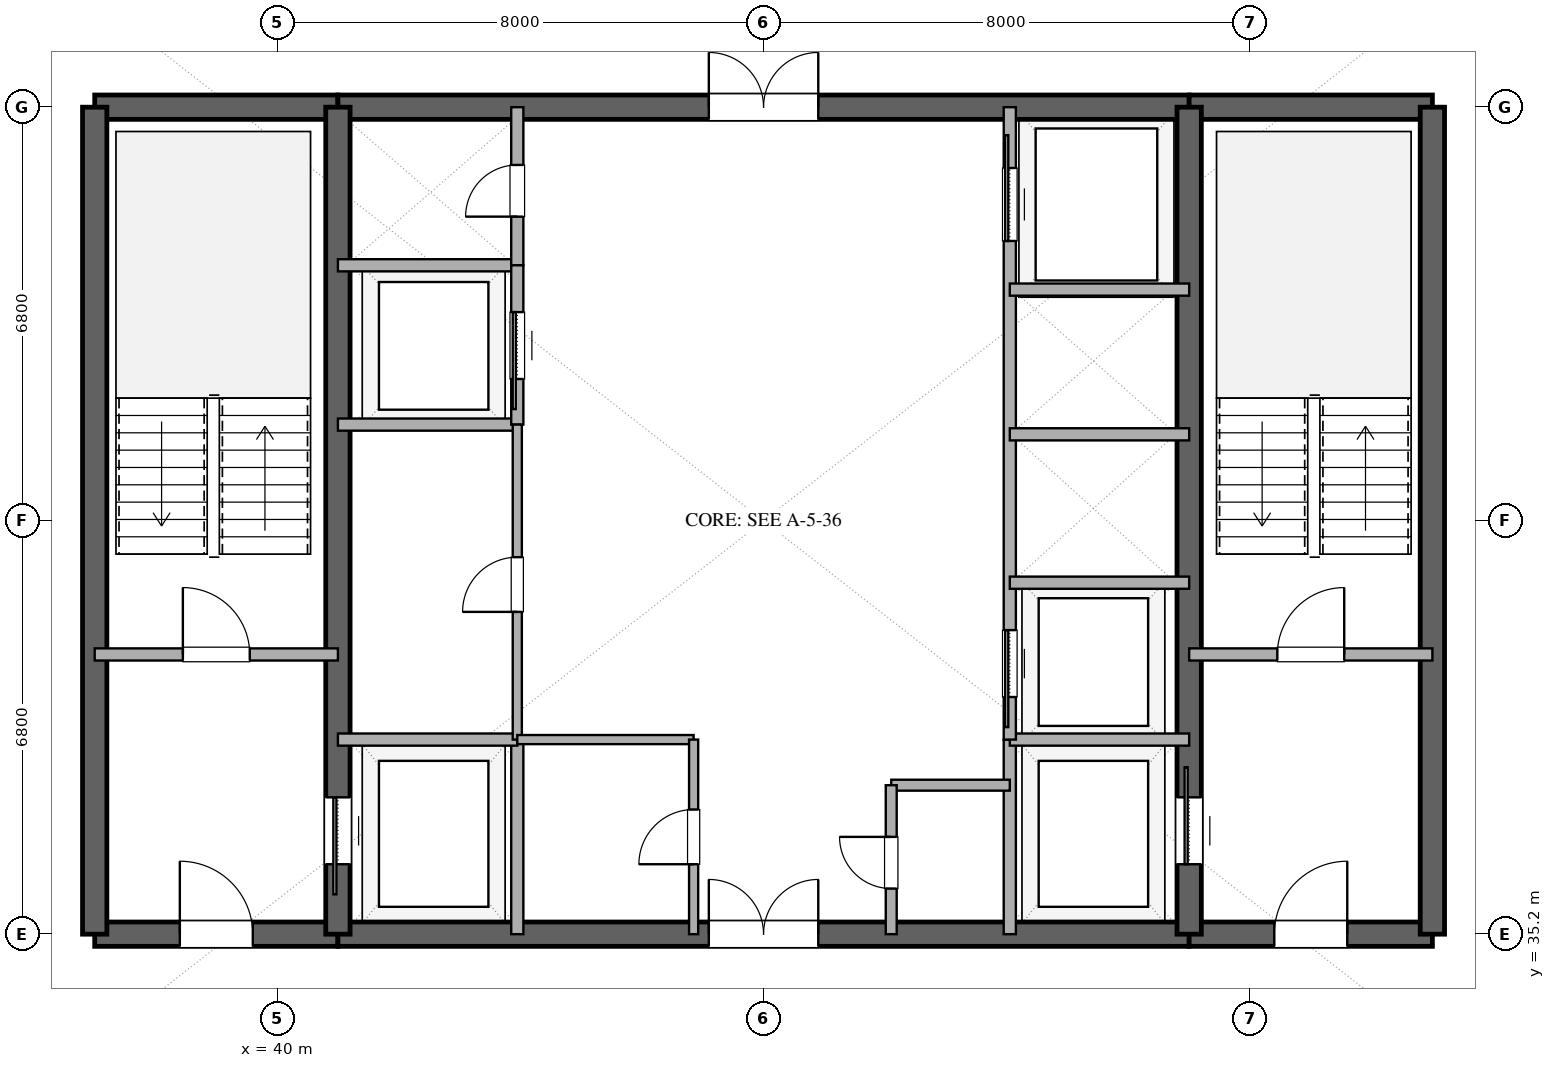
"""IFC4 building model, lengths in metres.
Left out: names, types, materials, properties, quantities, classifications, styles, units other than length and angle.
Written with IfcOpenShell. Run it as: python <this file> out.ifc"""

import sys

from ifc_helpers import new_model, si_unit, direction, frame, frame_2d, origin, place, context, subcontext, project, spatial, rectangle, extrude, element, fill, save


model = new_model("IFC4")
c1 = context("Model", 3, precision=1e-05, world=origin(), true_north=direction((0.0, 1.0)))
c2 = subcontext(c1, "Body", "Model", "MODEL_VIEW")
j1 = project(units=[si_unit("LENGTHUNIT", "METRE"), si_unit("PLANEANGLEUNIT", "RADIAN")], contexts=[c1])
p1 = place(None, origin())
s1 = spatial("IfcSite", under=j1, at=p1, CompositionType="ELEMENT")
p2 = place(p1, origin())
s2 = spatial("IfcBuilding", under=s1, at=p2, CompositionType="ELEMENT")
p3 = place(p2, frame((0.0, 0.0, 249.6)))
s3 = spatial("IfcBuildingStorey", under=s2, at=p3, CompositionType="ELEMENT", Elevation=249.6)
p4 = place(p3, frame((37.0, 35.2, 0.0), z_axis=(0.0, 0.0, 1.0), x_axis=(1.0, 0.0, 0.0)))
e1 = element("IfcWall", 1, at=p4, inside=s3, PredefinedType="SHEAR", context=c2, shape_type="SweptSolid", body=[
    extrude(rectangle(XDim=4.0, YDim=0.4, at=frame_2d((2.0, 0.0))), origin(), (0.0, 0.0, 1.0), 3.36),
])
p5 = place(p4, frame((1.4, 0.0, 0.0)))
e2 = element("IfcOpeningElement", 2, at=p5, cuts=e1, PredefinedType="OPENING", context=c2, shape_type="SweptSolid", body=[
    extrude(rectangle(XDim=1.2, YDim=2.15, at=frame_2d((0.6, 1.075))), frame((0.0, 0.21, 0.0), z_axis=(0.0, -1.0, 0.0), x_axis=(1.0, 0.0, 0.0)), (0.0, 0.0, 1.0), 0.42),
])
p6 = place(p3, frame((41.0, 35.2, 0.0), z_axis=(0.0, 0.0, 1.0), x_axis=(1.0, 0.0, 0.0)))
e3 = element("IfcWall", 3, at=p6, inside=s3, PredefinedType="SHEAR", context=c2, shape_type="SweptSolid", body=[
    extrude(rectangle(XDim=14.0, YDim=0.4, at=frame_2d((7.0, 0.0))), origin(), (0.0, 0.0, 1.0), 3.36),
])
p7 = place(p6, frame((6.1, 0.0, 0.0)))
e4 = element("IfcOpeningElement", 4, at=p7, cuts=e3, PredefinedType="OPENING", context=c2, shape_type="SweptSolid", body=[
    extrude(rectangle(XDim=1.8, YDim=2.25, at=frame_2d((0.9, 1.125))), frame((0.0, 0.21, 0.0), z_axis=(0.0, -1.0, 0.0), x_axis=(1.0, 0.0, 0.0)), (0.0, 0.0, 1.0), 0.42),
])
p8 = place(p3, frame((55.0, 35.2, 0.0), z_axis=(0.0, 0.0, 1.0), x_axis=(1.0, 0.0, 0.0)))
e5 = element("IfcWall", 5, at=p8, inside=s3, PredefinedType="SHEAR", context=c2, shape_type="SweptSolid", body=[
    extrude(rectangle(XDim=4.0, YDim=0.4, at=frame_2d((2.0, 0.0))), origin(), (0.0, 0.0, 1.0), 3.36),
])
p9 = place(p8, frame((1.4, 0.0, 0.0)))
e6 = element("IfcOpeningElement", 6, at=p9, cuts=e5, PredefinedType="OPENING", context=c2, shape_type="SweptSolid", body=[
    extrude(rectangle(XDim=1.2, YDim=2.15, at=frame_2d((0.6, 1.075))), frame((0.0, 0.21, 0.0), z_axis=(0.0, -1.0, 0.0), x_axis=(1.0, 0.0, 0.0)), (0.0, 0.0, 1.0), 0.42),
])
p10 = place(p3, frame((37.0, 48.8, 0.0), z_axis=(0.0, 0.0, 1.0), x_axis=(1.0, 0.0, 0.0)))
e7 = element("IfcWall", 7, at=p10, inside=s3, PredefinedType="SHEAR", context=c2, shape_type="SweptSolid", body=[
    extrude(rectangle(XDim=4.0, YDim=0.4, at=frame_2d((2.0, 0.0))), origin(), (0.0, 0.0, 1.0), 3.36),
])
p11 = place(p3, frame((41.0, 48.8, 0.0), z_axis=(0.0, 0.0, 1.0), x_axis=(1.0, 0.0, 0.0)))
e8 = element("IfcWall", 8, at=p11, inside=s3, PredefinedType="SHEAR", context=c2, shape_type="SweptSolid", body=[
    extrude(rectangle(XDim=14.0, YDim=0.4, at=frame_2d((7.0, 0.0))), origin(), (0.0, 0.0, 1.0), 3.36),
])
p12 = place(p11, frame((6.1, 0.0, 0.0)))
e9 = element("IfcOpeningElement", 9, at=p12, cuts=e8, PredefinedType="OPENING", context=c2, shape_type="SweptSolid", body=[
    extrude(rectangle(XDim=1.8, YDim=2.25, at=frame_2d((0.9, 1.125))), frame((0.0, 0.21, 0.0), z_axis=(0.0, -1.0, 0.0), x_axis=(1.0, 0.0, 0.0)), (0.0, 0.0, 1.0), 0.42),
])
p13 = place(p3, frame((55.0, 48.8, 0.0), z_axis=(0.0, 0.0, 1.0), x_axis=(1.0, 0.0, 0.0)))
e10 = element("IfcWall", 10, at=p13, inside=s3, PredefinedType="SHEAR", context=c2, shape_type="SweptSolid", body=[
    extrude(rectangle(XDim=4.0, YDim=0.4, at=frame_2d((2.0, 0.0))), origin(), (0.0, 0.0, 1.0), 3.36),
])
for number, where, z_axis, x_axis in (
    (11, (37.0, 35.2, 0.0), (0.0, 0.0, 1.0), (0.0, 1.0, 0.0)),
    (12, (59.0, 35.2, 0.0), (0.0, 0.0, 1.0), (0.0, 1.0, 0.0)),
):
    element("IfcWall", number, at=place(p3, frame(where, z_axis=z_axis, x_axis=x_axis)), inside=s3, PredefinedType="SHEAR", context=c2, shape_type="SweptSolid", body=[
        extrude(rectangle(XDim=13.6, YDim=0.4, at=frame_2d((6.8, 0.0))), origin(), (0.0, 0.0, 1.0), 3.36),
    ])
p14 = place(p3, frame((41.0, 35.2, 0.0), z_axis=(0.0, 0.0, 1.0), x_axis=(0.0, 1.0, 0.0)))
e13 = element("IfcWall", 13, at=p14, inside=s3, PredefinedType="SHEAR", context=c2, shape_type="SweptSolid", body=[
    extrude(rectangle(XDim=13.6, YDim=0.4, at=frame_2d((6.8, 0.0))), origin(), (0.0, 0.0, 1.0), 3.36),
])
p15 = place(p14, frame((1.15, 0.0, 0.0)))
e14 = element("IfcOpeningElement", 14, at=p15, cuts=e13, PredefinedType="OPENING", context=c2, shape_type="SweptSolid", body=[
    extrude(rectangle(XDim=1.1, YDim=2.2, at=frame_2d((0.55, 1.1))), frame((0.0, 0.21, 0.0), z_axis=(0.0, -1.0, 0.0), x_axis=(1.0, 0.0, 0.0)), (0.0, 0.0, 1.0), 0.42),
])
p16 = place(p3, frame((55.0, 35.2, 0.0), z_axis=(0.0, 0.0, 1.0), x_axis=(0.0, 1.0, 0.0)))
e15 = element("IfcWall", 15, at=p16, inside=s3, PredefinedType="SHEAR", context=c2, shape_type="SweptSolid", body=[
    extrude(rectangle(XDim=13.6, YDim=0.4, at=frame_2d((6.8, 0.0))), origin(), (0.0, 0.0, 1.0), 3.36),
])
p17 = place(p16, frame((1.15, 0.0, 0.0)))
e16 = element("IfcOpeningElement", 16, at=p17, cuts=e15, PredefinedType="OPENING", context=c2, shape_type="SweptSolid", body=[
    extrude(rectangle(XDim=1.1, YDim=2.2, at=frame_2d((0.55, 1.1))), frame((0.0, 0.21, 0.0), z_axis=(0.0, -1.0, 0.0), x_axis=(1.0, 0.0, 0.0)), (0.0, 0.0, 1.0), 0.42),
])
p18 = place(p3, frame((37.0, 39.8, 0.0), z_axis=(0.0, 0.0, 1.0), x_axis=(1.0, 0.0, 0.0)))
e17 = element("IfcWall", 17, at=p18, inside=s3, PredefinedType="SOLIDWALL", context=c2, shape_type="SweptSolid", body=[
    extrude(rectangle(XDim=4.0, YDim=0.2, at=frame_2d((2.0, 0.0))), origin(), (0.0, 0.0, 1.0), 2.72),
])
p19 = place(p18, frame((1.45, 0.0, 0.0)))
e18 = element("IfcOpeningElement", 18, at=p19, cuts=e17, PredefinedType="OPENING", context=c2, shape_type="SweptSolid", body=[
    extrude(rectangle(XDim=1.1, YDim=2.15, at=frame_2d((0.55, 1.075))), frame((0.0, 0.11, 0.0), z_axis=(0.0, -1.0, 0.0), x_axis=(1.0, 0.0, 0.0)), (0.0, 0.0, 1.0), 0.22),
])
p20 = place(p3, frame((55.0, 39.8, 0.0), z_axis=(0.0, 0.0, 1.0), x_axis=(1.0, 0.0, 0.0)))
e19 = element("IfcWall", 19, at=p20, inside=s3, PredefinedType="SOLIDWALL", context=c2, shape_type="SweptSolid", body=[
    extrude(rectangle(XDim=4.0, YDim=0.2, at=frame_2d((2.0, 0.0))), origin(), (0.0, 0.0, 1.0), 2.72),
])
p21 = place(p20, frame((1.45, 0.0, 0.0)))
e20 = element("IfcOpeningElement", 20, at=p21, cuts=e19, PredefinedType="OPENING", context=c2, shape_type="SweptSolid", body=[
    extrude(rectangle(XDim=1.1, YDim=2.15, at=frame_2d((0.55, 1.075))), frame((0.0, 0.11, 0.0), z_axis=(0.0, -1.0, 0.0), x_axis=(1.0, 0.0, 0.0)), (0.0, 0.0, 1.0), 0.22),
])
p22 = place(p3, frame((43.95, 35.2, 0.0), z_axis=(0.0, 0.0, 1.0), x_axis=(0.0, 1.0, 0.0)))
e21 = element("IfcWall", 21, at=p22, inside=s3, PredefinedType="SOLIDWALL", context=c2, shape_type="SweptSolid", body=[
    extrude(rectangle(XDim=3.2, YDim=0.2, at=frame_2d((1.6, 0.0))), origin(), (0.0, 0.0, 1.0), 2.72),
])
p23 = place(p3, frame((41.0, 38.4, 0.0), z_axis=(0.0, 0.0, 1.0), x_axis=(1.0, 0.0, 0.0)))
e22 = element("IfcWall", 22, at=p23, inside=s3, PredefinedType="SOLIDWALL", context=c2, shape_type="SweptSolid", body=[
    extrude(rectangle(XDim=2.95, YDim=0.2, at=frame_2d((1.475, 0.0))), origin(), (0.0, 0.0, 1.0), 2.72),
])
p24 = place(p3, frame((52.05, 35.2, 0.0), z_axis=(0.0, 0.0, 1.0), x_axis=(0.0, 1.0, 0.0)))
e23 = element("IfcWall", 23, at=p24, inside=s3, PredefinedType="SOLIDWALL", context=c2, shape_type="SweptSolid", body=[
    extrude(rectangle(XDim=3.2, YDim=0.2, at=frame_2d((1.6, 0.0))), origin(), (0.0, 0.0, 1.0), 2.72),
])
for number, where, z_axis, x_axis in (
    (24, (52.05, 38.4, 0.0), (0.0, 0.0, 1.0), (1.0, 0.0, 0.0)),
    (25, (41.0, 46.2, 0.0), (0.0, 0.0, 1.0), (1.0, 0.0, 0.0)),
):
    element("IfcWall", number, at=place(p3, frame(where, z_axis=z_axis, x_axis=x_axis)), inside=s3, PredefinedType="SOLIDWALL", context=c2, shape_type="SweptSolid", body=[
        extrude(rectangle(XDim=2.95, YDim=0.2, at=frame_2d((1.475, 0.0))), origin(), (0.0, 0.0, 1.0), 2.72),
    ])
p25 = place(p3, frame((43.95, 46.2, 0.0), z_axis=(0.0, 0.0, 1.0), x_axis=(0.0, 1.0, 0.0)))
e26 = element("IfcWall", 26, at=p25, inside=s3, PredefinedType="SOLIDWALL", context=c2, shape_type="SweptSolid", body=[
    extrude(rectangle(XDim=2.6, YDim=0.2, at=frame_2d((1.3, 0.0))), origin(), (0.0, 0.0, 1.0), 2.72),
])
p26 = place(p25, frame((0.8, 0.0, 0.0)))
e27 = element("IfcOpeningElement", 27, at=p26, cuts=e26, PredefinedType="OPENING", context=c2, shape_type="SweptSolid", body=[
    extrude(rectangle(XDim=0.85, YDim=2.15, at=frame_2d((0.425, 1.075))), frame((0.0, 0.11, 0.0), z_axis=(0.0, -1.0, 0.0), x_axis=(1.0, 0.0, 0.0)), (0.0, 0.0, 1.0), 0.22),
])
p27 = place(p3, frame((41.0, 43.58, 0.0), z_axis=(0.0, 0.0, 1.0), x_axis=(1.0, 0.0, 0.0)))
e28 = element("IfcWall", 28, at=p27, inside=s3, PredefinedType="SOLIDWALL", context=c2, shape_type="SweptSolid", body=[
    extrude(rectangle(XDim=2.95, YDim=0.2, at=frame_2d((1.475, 0.0))), origin(), (0.0, 0.0, 1.0), 2.72),
])
p28 = place(p3, frame((43.95, 43.58, 0.0), z_axis=(0.0, 0.0, 1.0), x_axis=(0.0, 1.0, 0.0)))
e29 = element("IfcWall", 29, at=p28, inside=s3, PredefinedType="SOLIDWALL", context=c2, shape_type="SweptSolid", body=[
    extrude(rectangle(XDim=2.62, YDim=0.2, at=frame_2d((1.31, 0.0))), origin(), (0.0, 0.0, 1.0), 2.72),
])
p29 = place(p28, frame((0.75, 0.0, 0.0)))
e30 = element("IfcOpeningElement", 30, at=p29, cuts=e29, PredefinedType="OPENING", context=c2, shape_type="SweptSolid", body=[
    extrude(rectangle(XDim=1.1, YDim=2.2, at=frame_2d((0.55, 1.1))), frame((0.0, 0.11, 0.0), z_axis=(0.0, -1.0, 0.0), x_axis=(1.0, 0.0, 0.0)), (0.0, 0.0, 1.0), 0.22),
])
p30 = place(p3, frame((43.95, 38.4, 0.0), z_axis=(0.0, 0.0, 1.0), x_axis=(0.0, 1.0, 0.0)))
e31 = element("IfcWall", 31, at=p30, inside=s3, PredefinedType="PARTITIONING", context=c2, shape_type="SweptSolid", body=[
    extrude(rectangle(XDim=5.18, YDim=0.15, at=frame_2d((2.59, 0.0))), origin(), (0.0, 0.0, 1.0), 2.72),
])
p31 = place(p30, frame((2.1, 0.0, 0.0)))
e32 = element("IfcOpeningElement", 32, at=p31, cuts=e31, PredefinedType="OPENING", context=c2, shape_type="SweptSolid", body=[
    extrude(rectangle(XDim=0.9, YDim=2.15, at=frame_2d((0.45, 1.075))), frame((0.0, 0.085, 0.0), z_axis=(0.0, -1.0, 0.0), x_axis=(1.0, 0.0, 0.0)), (0.0, 0.0, 1.0), 0.17),
])
p32 = place(p3, frame((52.05, 38.4, 0.0), z_axis=(0.0, 0.0, 1.0), x_axis=(0.0, 1.0, 0.0)))
e33 = element("IfcWall", 33, at=p32, inside=s3, PredefinedType="SOLIDWALL", context=c2, shape_type="SweptSolid", body=[
    extrude(rectangle(XDim=10.4, YDim=0.2, at=frame_2d((5.2, 0.0))), origin(), (0.0, 0.0, 1.0), 2.72),
])
p33 = place(p32, frame((0.7, 0.0, 0.0)))
e34 = element("IfcOpeningElement", 34, at=p33, cuts=e33, PredefinedType="OPENING", context=c2, shape_type="SweptSolid", body=[
    extrude(rectangle(XDim=1.1, YDim=2.2, at=frame_2d((0.55, 1.1))), frame((0.0, 0.11, 0.0), z_axis=(0.0, -1.0, 0.0), x_axis=(1.0, 0.0, 0.0)), (0.0, 0.0, 1.0), 0.22),
])
p34 = place(p32, frame((8.2, 0.0, 0.0)))
e35 = element("IfcOpeningElement", 35, at=p34, cuts=e33, PredefinedType="OPENING", context=c2, shape_type="SweptSolid", body=[
    extrude(rectangle(XDim=1.2, YDim=2.2, at=frame_2d((0.6, 1.1))), frame((0.0, 0.11, 0.0), z_axis=(0.0, -1.0, 0.0), x_axis=(1.0, 0.0, 0.0)), (0.0, 0.0, 1.0), 0.22),
])
for number, where, z_axis, x_axis in (
    (36, (52.05, 40.98, 0.0), (0.0, 0.0, 1.0), (1.0, 0.0, 0.0)),
    (37, (52.05, 43.42, 0.0), (0.0, 0.0, 1.0), (1.0, 0.0, 0.0)),
    (38, (52.05, 45.8, 0.0), (0.0, 0.0, 1.0), (1.0, 0.0, 0.0)),
):
    element("IfcWall", number, at=place(p3, frame(where, z_axis=z_axis, x_axis=x_axis)), inside=s3, PredefinedType="SOLIDWALL", context=c2, shape_type="SweptSolid", body=[
        extrude(rectangle(XDim=2.95, YDim=0.2, at=frame_2d((1.475, 0.0))), origin(), (0.0, 0.0, 1.0), 2.72),
    ])
p35 = place(p3, frame((43.95, 38.4, 0.0), z_axis=(0.0, 0.0, 1.0), x_axis=(1.0, 0.0, 0.0)))
e39 = element("IfcWall", 39, at=p35, inside=s3, PredefinedType="PARTITIONING", context=c2, shape_type="SweptSolid", body=[
    extrude(rectangle(XDim=2.9, YDim=0.15, at=frame_2d((1.45, 0.0))), origin(), (0.0, 0.0, 1.0), 2.72),
])
p36 = place(p3, frame((46.85, 35.2, 0.0), z_axis=(0.0, 0.0, 1.0), x_axis=(0.0, 1.0, 0.0)))
e40 = element("IfcWall", 40, at=p36, inside=s3, PredefinedType="PARTITIONING", context=c2, shape_type="SweptSolid", body=[
    extrude(rectangle(XDim=3.2, YDim=0.15, at=frame_2d((1.6, 0.0))), origin(), (0.0, 0.0, 1.0), 2.72),
])
p37 = place(p36, frame((1.15, 0.0, 0.0)))
e41 = element("IfcOpeningElement", 41, at=p37, cuts=e40, PredefinedType="OPENING", context=c2, shape_type="SweptSolid", body=[
    extrude(rectangle(XDim=0.9, YDim=2.15, at=frame_2d((0.45, 1.075))), frame((0.0, 0.085, 0.0), z_axis=(0.0, -1.0, 0.0), x_axis=(1.0, 0.0, 0.0)), (0.0, 0.0, 1.0), 0.17),
])
p38 = place(p3, frame((50.1, 37.65, 0.0), z_axis=(0.0, 0.0, 1.0), x_axis=(1.0, 0.0, 0.0)))
e42 = element("IfcWall", 42, at=p38, inside=s3, PredefinedType="PLUMBINGWALL", context=c2, shape_type="SweptSolid", body=[
    extrude(rectangle(XDim=1.95, YDim=0.18, at=frame_2d((0.975, 0.0))), origin(), (0.0, 0.0, 1.0), 2.72),
])
p39 = place(p3, frame((50.1, 35.2, 0.0), z_axis=(0.0, 0.0, 1.0), x_axis=(0.0, 1.0, 0.0)))
e43 = element("IfcWall", 43, at=p39, inside=s3, PredefinedType="PLUMBINGWALL", context=c2, shape_type="SweptSolid", body=[
    extrude(rectangle(XDim=2.45, YDim=0.18, at=frame_2d((1.225, 0.0))), origin(), (0.0, 0.0, 1.0), 2.72),
])
p40 = place(p39, frame((0.75, 0.0, 0.0)))
e44 = element("IfcOpeningElement", 44, at=p40, cuts=e43, PredefinedType="OPENING", context=c2, shape_type="SweptSolid", body=[
    extrude(rectangle(XDim=0.85, YDim=2.1, at=frame_2d((0.425, 1.05))), frame((0.0, 0.1, 0.0), z_axis=(0.0, -1.0, 0.0), x_axis=(1.0, 0.0, 0.0)), (0.0, 0.0, 1.0), 0.2),
])
p41 = place(p15, origin())
e45 = element("IfcDoor", 45, at=p41, inside=s3, OperationType="SLIDING_TO_LEFT", PredefinedType="DOOR", context=c2, shape_type="SweptSolid", body=[
    extrude(rectangle(XDim=1.1, YDim=2.2, at=frame_2d((0.55, 1.1))), frame((0.0, 0.025, 0.0), z_axis=(0.0, -1.0, 0.0), x_axis=(1.0, 0.0, 0.0)), (0.0, 0.0, 1.0), 0.05),
])
fill(e14, e45)
p42 = place(p17, origin())
e46 = element("IfcDoor", 46, at=p42, inside=s3, OperationType="SLIDING_TO_RIGHT", PredefinedType="DOOR", context=c2, shape_type="SweptSolid", body=[
    extrude(rectangle(XDim=1.1, YDim=2.2, at=frame_2d((0.55, 1.1))), frame((0.0, 0.025, 0.0), z_axis=(0.0, -1.0, 0.0), x_axis=(1.0, 0.0, 0.0)), (0.0, 0.0, 1.0), 0.05),
])
fill(e16, e46)
p43 = place(p5, origin())
e47 = element("IfcDoor", 47, at=p43, inside=s3, OperationType="SINGLE_SWING_LEFT", PredefinedType="DOOR", context=c2, shape_type="SweptSolid", body=[
    extrude(rectangle(XDim=1.2, YDim=2.15, at=frame_2d((0.6, 1.075))), frame((0.0, 0.025, 0.0), z_axis=(0.0, -1.0, 0.0), x_axis=(1.0, 0.0, 0.0)), (0.0, 0.0, 1.0), 0.05),
])
fill(e2, e47)
p44 = place(p9, origin())
e48 = element("IfcDoor", 48, at=p44, inside=s3, OperationType="SINGLE_SWING_RIGHT", PredefinedType="DOOR", context=c2, shape_type="SweptSolid", body=[
    extrude(rectangle(XDim=1.2, YDim=2.15, at=frame_2d((0.6, 1.075))), frame((0.0, 0.025, 0.0), z_axis=(0.0, -1.0, 0.0), x_axis=(1.0, 0.0, 0.0)), (0.0, 0.0, 1.0), 0.05),
])
fill(e6, e48)
p45 = place(p7, origin())
e49 = element("IfcDoor", 49, at=p45, inside=s3, OperationType="DOUBLE_DOOR_SINGLE_SWING", PredefinedType="DOOR", context=c2, shape_type="SweptSolid", body=[
    extrude(rectangle(XDim=1.8, YDim=2.25, at=frame_2d((0.9, 1.125))), frame((0.0, 0.025, 0.0), z_axis=(0.0, -1.0, 0.0), x_axis=(1.0, 0.0, 0.0)), (0.0, 0.0, 1.0), 0.05),
])
fill(e4, e49)
p46 = place(p12, origin())
e50 = element("IfcDoor", 50, at=p46, inside=s3, OperationType="DOUBLE_DOOR_SINGLE_SWING", PredefinedType="DOOR", context=c2, shape_type="SweptSolid", body=[
    extrude(rectangle(XDim=1.8, YDim=2.25, at=frame_2d((0.9, 1.125))), frame((0.0, 0.025, 0.0), z_axis=(0.0, -1.0, 0.0), x_axis=(1.0, 0.0, 0.0)), (0.0, 0.0, 1.0), 0.05),
])
fill(e9, e50)
p47 = place(p19, origin())
e51 = element("IfcDoor", 51, at=p47, inside=s3, OperationType="SINGLE_SWING_LEFT", PredefinedType="DOOR", context=c2, shape_type="SweptSolid", body=[
    extrude(rectangle(XDim=1.1, YDim=2.15, at=frame_2d((0.55, 1.075))), frame((0.0, 0.025, 0.0), z_axis=(0.0, -1.0, 0.0), x_axis=(1.0, 0.0, 0.0)), (0.0, 0.0, 1.0), 0.05),
])
fill(e18, e51)
p48 = place(p21, origin())
e52 = element("IfcDoor", 52, at=p48, inside=s3, OperationType="SINGLE_SWING_RIGHT", PredefinedType="DOOR", context=c2, shape_type="SweptSolid", body=[
    extrude(rectangle(XDim=1.1, YDim=2.15, at=frame_2d((0.55, 1.075))), frame((0.0, 0.025, 0.0), z_axis=(0.0, -1.0, 0.0), x_axis=(1.0, 0.0, 0.0)), (0.0, 0.0, 1.0), 0.05),
])
fill(e20, e52)
p49 = place(p26, origin())
e53 = element("IfcDoor", 53, at=p49, inside=s3, OperationType="SINGLE_SWING_LEFT", PredefinedType="DOOR", context=c2, shape_type="SweptSolid", body=[
    extrude(rectangle(XDim=0.85, YDim=2.15, at=frame_2d((0.425, 1.075))), frame((0.0, 0.025, 0.0), z_axis=(0.0, -1.0, 0.0), x_axis=(1.0, 0.0, 0.0)), (0.0, 0.0, 1.0), 0.05),
])
fill(e27, e53)
p50 = place(p29, origin())
e54 = element("IfcDoor", 54, at=p50, inside=s3, OperationType="SLIDING_TO_LEFT", PredefinedType="DOOR", context=c2, shape_type="SweptSolid", body=[
    extrude(rectangle(XDim=1.1, YDim=2.2, at=frame_2d((0.55, 1.1))), frame((0.0, 0.025, 0.0), z_axis=(0.0, -1.0, 0.0), x_axis=(1.0, 0.0, 0.0)), (0.0, 0.0, 1.0), 0.05),
])
fill(e30, e54)
p51 = place(p31, origin())
e55 = element("IfcDoor", 55, at=p51, inside=s3, OperationType="SINGLE_SWING_LEFT", PredefinedType="DOOR", context=c2, shape_type="SweptSolid", body=[
    extrude(rectangle(XDim=0.9, YDim=2.15, at=frame_2d((0.45, 1.075))), frame((0.0, 0.025, 0.0), z_axis=(0.0, -1.0, 0.0), x_axis=(1.0, 0.0, 0.0)), (0.0, 0.0, 1.0), 0.05),
])
fill(e32, e55)
p52 = place(p33, origin())
e56 = element("IfcDoor", 56, at=p52, inside=s3, OperationType="SLIDING_TO_LEFT", PredefinedType="DOOR", context=c2, shape_type="SweptSolid", body=[
    extrude(rectangle(XDim=1.1, YDim=2.2, at=frame_2d((0.55, 1.1))), frame((0.0, 0.025, 0.0), z_axis=(0.0, -1.0, 0.0), x_axis=(1.0, 0.0, 0.0)), (0.0, 0.0, 1.0), 0.05),
])
fill(e34, e56)
p53 = place(p34, origin())
e57 = element("IfcDoor", 57, at=p53, inside=s3, OperationType="SLIDING_TO_RIGHT", PredefinedType="DOOR", context=c2, shape_type="SweptSolid", body=[
    extrude(rectangle(XDim=1.2, YDim=2.2, at=frame_2d((0.6, 1.1))), frame((0.0, 0.025, 0.0), z_axis=(0.0, -1.0, 0.0), x_axis=(1.0, 0.0, 0.0)), (0.0, 0.0, 1.0), 0.05),
])
fill(e35, e57)
p54 = place(p37, origin())
e58 = element("IfcDoor", 58, at=p54, inside=s3, OperationType="SINGLE_SWING_LEFT", PredefinedType="DOOR", context=c2, shape_type="SweptSolid", body=[
    extrude(rectangle(XDim=0.9, YDim=2.15, at=frame_2d((0.45, 1.075))), frame((0.0, 0.025, 0.0), z_axis=(0.0, -1.0, 0.0), x_axis=(1.0, 0.0, 0.0)), (0.0, 0.0, 1.0), 0.05),
])
fill(e41, e58)
p55 = place(p40, origin())
e59 = element("IfcDoor", 59, at=p55, inside=s3, OperationType="SINGLE_SWING_RIGHT", PredefinedType="DOOR", context=c2, shape_type="SweptSolid", body=[
    extrude(rectangle(XDim=0.85, YDim=2.1, at=frame_2d((0.425, 1.05))), frame((0.0, 0.025, 0.0), z_axis=(0.0, -1.0, 0.0), x_axis=(1.0, 0.0, 0.0)), (0.0, 0.0, 1.0), 0.05),
])
fill(e44, e59)
save(model, sys.argv[1])
